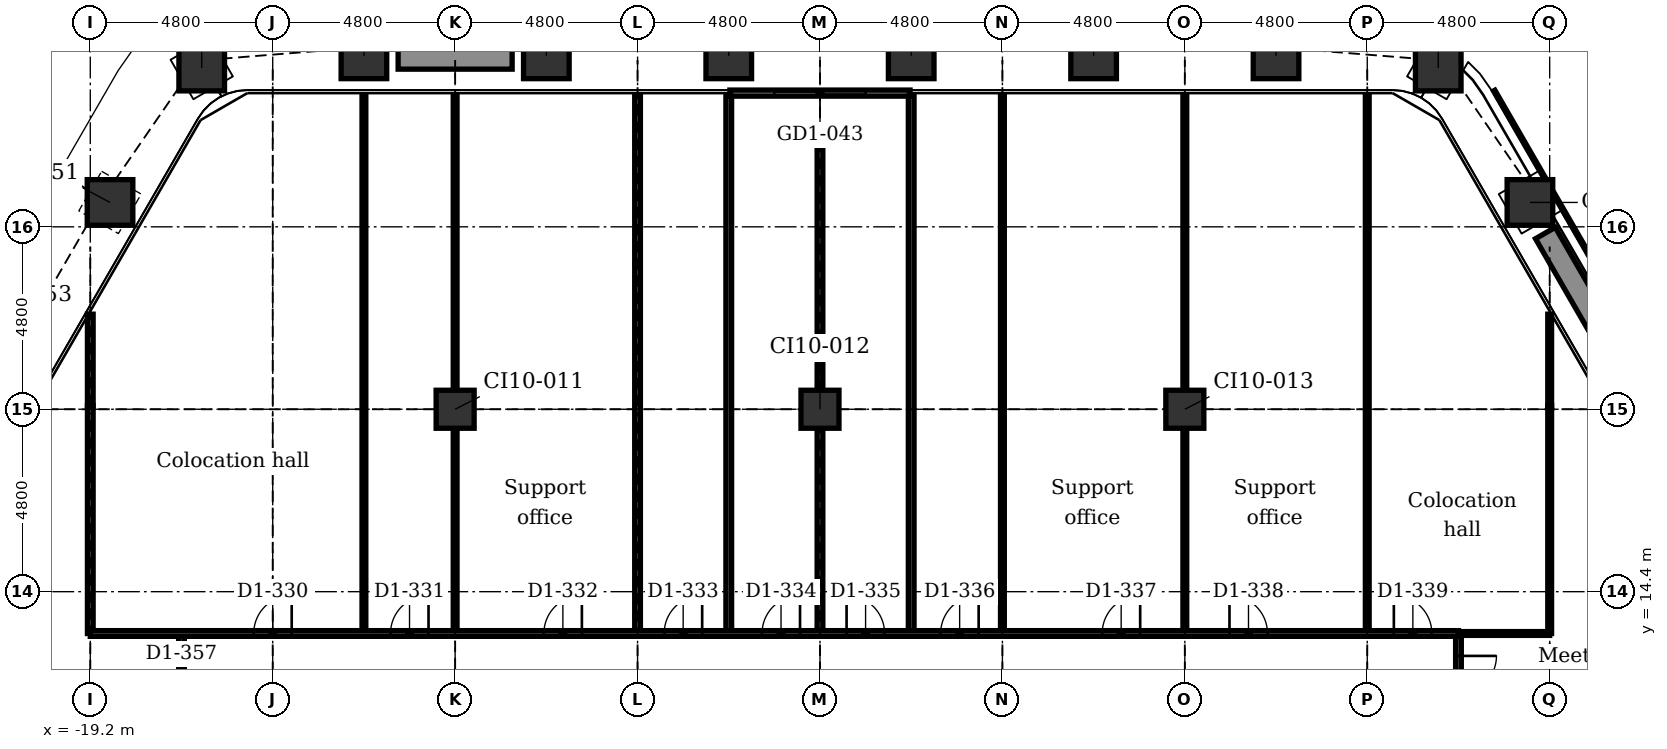
"""IFC4 building model, lengths in metres.
Left out: names, types, materials, properties, quantities, classifications, styles, units other than length and angle.
Written with IfcOpenShell. Run it as: python <this file> out.ifc"""

import sys

from ifc_helpers import new_model, si_unit, direction, frame, frame_2d, origin, origin_2d, place, context, subcontext, project, spatial, rectangle, extrude, element, fill, save


model = new_model("IFC4")
c1 = context("Model", 3, precision=1e-05, world=origin(), true_north=direction((0.0, 1.0)))
c2 = subcontext(c1, "Body", "Model", "MODEL_VIEW")
j1 = project(units=[si_unit("LENGTHUNIT", "METRE"), si_unit("PLANEANGLEUNIT", "RADIAN")], contexts=[c1])
p1 = place(None, origin())
s1 = spatial("IfcSite", under=j1, at=p1, CompositionType="ELEMENT")
p2 = place(p1, origin())
s2 = spatial("IfcBuilding", under=s1, at=p2, CompositionType="ELEMENT")
p3 = place(p2, frame((0.0, 0.0, 122.9)))
s3 = spatial("IfcBuildingStorey", under=s2, at=p3, CompositionType="ELEMENT", Elevation=122.9)
for number, where, z_axis, x_axis in (
    (1, (-16.268, 28.177, -0.2), (0.0, 0.0, 1.0), (0.866, 0.5, 0.0)),
    (2, (-12.0, 28.499, -0.2), (0.0, 0.0, 1.0), (1.0, 0.0, 0.0)),
    (3, (-7.2, 28.499, -0.2), (0.0, 0.0, 1.0), (1.0, 0.0, 0.0)),
    (4, (-2.4, 28.499, -0.2), (0.0, 0.0, 1.0), (1.0, 0.0, 0.0)),
    (5, (2.4, 28.499, -0.2), (0.0, 0.0, 1.0), (1.0, 0.0, 0.0)),
    (6, (7.2, 28.499, -0.2), (0.0, 0.0, 1.0), (1.0, 0.0, 0.0)),
    (7, (12.0, 28.499, -0.2), (0.0, 0.0, 1.0), (1.0, 0.0, 0.0)),
    (8, (16.268, 28.177, -0.2), (0.0, 0.0, 1.0), (0.5, 0.866, 0.0)),
    (9, (18.68, 24.642, -0.2), (0.0, 0.0, 1.0), (0.866, 0.5, 0.0)),
    (10, (-18.68, 24.642, -0.2), (0.0, 0.0, 1.0), (0.5, 0.866, 0.0)),
):
    element("IfcColumn", number, at=place(p3, frame(where, z_axis=z_axis, x_axis=x_axis)), inside=s3, PredefinedType="COLUMN", context=c2, shape_type="SweptSolid", body=[
        extrude(rectangle(XDim=1.2, YDim=1.2, at=origin_2d()), origin(), (0.0, 0.0, 1.0), 4.4),
    ])
for number, where, z_axis, x_axis in (
    (11, (-9.6, 19.2, -0.2), (0.0, 0.0, 1.0), (1.0, 0.0, 0.0)),
    (12, (0.0, 19.2, -0.2), (0.0, 0.0, 1.0), (1.0, 0.0, 0.0)),
    (13, (9.6, 19.2, -0.2), (0.0, 0.0, 1.0), (1.0, 0.0, 0.0)),
):
    element("IfcColumn", number, at=place(p3, frame(where, z_axis=z_axis, x_axis=x_axis)), inside=s3, PredefinedType="COLUMN", context=c2, shape_type="SweptSolid", body=[
        extrude(rectangle(XDim=1.0, YDim=1.0, at=origin_2d()), origin(), (0.0, 0.0, 1.0), 4.4),
    ])
p4 = place(p3, frame((-2.37, 27.519, 0.0), z_axis=(0.0, 0.0, 1.0), x_axis=(1.0, 0.0, 0.0)))
e14 = element("IfcWall", 14, at=p4, inside=s3, PredefinedType="PARTITIONING", context=c2, shape_type="SweptSolid", body=[
    extrude(rectangle(XDim=4.74, YDim=0.16, at=frame_2d((2.37, 0.0))), origin(), (0.0, 0.0, 1.0), 4.2),
])
p5 = place(p4, frame((1.17, 0.0, 0.0)))
e15 = element("IfcOpeningElement", 15, at=p5, cuts=e14, PredefinedType="OPENING", context=c2, shape_type="SweptSolid", body=[
    extrude(rectangle(XDim=2.4, YDim=2.4, at=frame_2d((1.2, 1.2))), frame((0.0, 0.09, 0.0), z_axis=(0.0, -1.0, 0.0), x_axis=(1.0, 0.0, 0.0)), (0.0, 0.0, 1.0), 0.18),
])
for number, where, z_axis, x_axis in (
    (16, (-11.1, 28.448, 0.0), (0.0, 0.0, 1.0), (1.0, 0.0, 0.0)),
    (17, (19.087, 23.837, 0.0), (0.0, 0.0, 1.0), (0.5, -0.866, 0.0)),
):
    element("IfcWall", number, at=place(p3, frame(where, z_axis=z_axis, x_axis=x_axis)), inside=s3, PredefinedType="USERDEFINED", context=c2, shape_type="SweptSolid", body=[
        extrude(rectangle(XDim=3.0, YDim=0.6, at=frame_2d((1.5, 0.0))), origin(), (0.0, 0.0, 1.0), 0.7),
    ])
p6 = place(p3, frame((19.2, 13.3, 0.0), z_axis=(0.0, 0.0, 1.0), x_axis=(0.0, 1.0, 0.0)))
e18 = element("IfcWall", 18, at=p6, inside=s3, PredefinedType="PARTITIONING", context=c2, shape_type="SweptSolid", body=[
    extrude(rectangle(XDim=5.993, YDim=0.1, at=frame_2d((2.997, 0.0))), origin(), (0.0, 0.0, 1.0), 3.743),
])
p7 = place(p3, frame((19.2, 19.293, 0.0), z_axis=(0.0, 0.0, 1.0), x_axis=(0.0, 1.0, 0.0)))
e19 = element("IfcWall", 19, at=p7, inside=s3, PredefinedType="PARTITIONING", context=c2, shape_type="SweptSolid", body=[
    extrude(rectangle(XDim=2.408, YDim=0.1, at=frame_2d((1.204, 0.0))), origin(), (0.0, 0.0, 1.0), 3.89),
])
p8 = place(p3, frame((16.8, 3.95, 0.0), z_axis=(0.0, 0.0, 1.0), x_axis=(0.0, 1.0, 0.0)))
e20 = element("IfcWall", 20, at=p8, inside=s3, PredefinedType="PARTITIONING", context=c2, shape_type="SweptSolid", body=[
    extrude(rectangle(XDim=9.35, YDim=0.15, at=frame_2d((4.675, 0.0))), origin(), (0.0, 0.0, 1.0), 4.2),
])
p9 = place(p8, frame((1.275, 0.0, 0.0)))
e21 = element("IfcOpeningElement", 21, at=p9, cuts=e20, PredefinedType="OPENING", context=c2, shape_type="SweptSolid", body=[
    extrude(rectangle(XDim=1.0, YDim=2.1, at=frame_2d((0.5, 1.05))), frame((0.0, 0.085, 0.0), z_axis=(0.0, -1.0, 0.0), x_axis=(1.0, 0.0, 0.0)), (0.0, 0.0, 1.0), 0.17),
])
p10 = place(p8, frame((7.76, 0.0, 0.0)))
e22 = element("IfcOpeningElement", 22, at=p10, cuts=e20, PredefinedType="OPENING", context=c2, shape_type="SweptSolid", body=[
    extrude(rectangle(XDim=1.0, YDim=2.1, at=frame_2d((0.5, 1.05))), frame((0.0, 0.085, 0.0), z_axis=(0.0, -1.0, 0.0), x_axis=(1.0, 0.0, 0.0)), (0.0, 0.0, 1.0), 0.17),
])
p11 = place(p8, frame((3.4, 0.0, 0.9)))
e23 = element("IfcOpeningElement", 23, at=p11, cuts=e20, PredefinedType="OPENING", context=c2, shape_type="SweptSolid", body=[
    extrude(rectangle(XDim=2.4, YDim=1.5, at=frame_2d((1.2, 0.75))), frame((0.0, 0.085, 0.0), z_axis=(0.0, -1.0, 0.0), x_axis=(1.0, 0.0, 0.0)), (0.0, 0.0, 1.0), 0.17),
])
p12 = place(p3, frame((14.4, 13.3, 0.0), z_axis=(0.0, 0.0, 1.0), x_axis=(0.0, 1.0, 0.0)))
e24 = element("IfcWall", 24, at=p12, inside=s3, PredefinedType="PARTITIONING", context=c2, shape_type="SweptSolid", body=[
    extrude(rectangle(XDim=14.128, YDim=0.1, at=frame_2d((7.064, 0.0))), origin(), (0.0, 0.0, 1.0), 3.743),
])
p13 = place(p3, frame((9.6, 13.3, 0.0), z_axis=(0.0, 0.0, 1.0), x_axis=(0.0, 1.0, 0.0)))
e25 = element("IfcWall", 25, at=p13, inside=s3, PredefinedType="PARTITIONING", context=c2, shape_type="SweptSolid", body=[
    extrude(rectangle(XDim=5.4, YDim=0.1, at=frame_2d((2.7, 0.0))), origin(), (0.0, 0.0, 1.0), 3.743),
])
p14 = place(p3, frame((9.6, 19.7, 0.0), z_axis=(0.0, 0.0, 1.0), x_axis=(0.0, 1.0, 0.0)))
e26 = element("IfcWall", 26, at=p14, inside=s3, PredefinedType="PARTITIONING", context=c2, shape_type="SweptSolid", body=[
    extrude(rectangle(XDim=7.729, YDim=0.1, at=frame_2d((3.864, 0.0))), origin(), (0.0, 0.0, 1.0), 3.743),
])
p15 = place(p3, frame((4.8, 13.3, 0.0), z_axis=(0.0, 0.0, 1.0), x_axis=(0.0, 1.0, 0.0)))
e27 = element("IfcWall", 27, at=p15, inside=s3, PredefinedType="PARTITIONING", context=c2, shape_type="SweptSolid", body=[
    extrude(rectangle(XDim=14.128, YDim=0.1, at=frame_2d((7.064, 0.0))), origin(), (0.0, 0.0, 1.0), 3.743),
])
p16 = place(p3, frame((2.4, 13.3, 0.0), z_axis=(0.0, 0.0, 1.0), x_axis=(0.0, 1.0, 0.0)))
e28 = element("IfcWall", 28, at=p16, inside=s3, PredefinedType="PARTITIONING", context=c2, shape_type="SweptSolid", body=[
    extrude(rectangle(XDim=14.138, YDim=0.15, at=frame_2d((7.069, 0.0))), origin(), (0.0, 0.0, 1.0), 4.2),
])
p17 = place(p3, frame((0.0, 13.3, 0.0), z_axis=(0.0, 0.0, 1.0), x_axis=(0.0, 1.0, 0.0)))
e29 = element("IfcWall", 29, at=p17, inside=s3, PredefinedType="PARTITIONING", context=c2, shape_type="SweptSolid", body=[
    extrude(rectangle(XDim=5.4, YDim=0.15, at=frame_2d((2.7, 0.0))), origin(), (0.0, 0.0, 1.0), 3.743),
])
p18 = place(p3, frame((0.0, 19.7, 0.0), z_axis=(0.0, 0.0, 1.0), x_axis=(0.0, 1.0, 0.0)))
e30 = element("IfcWall", 30, at=p18, inside=s3, PredefinedType="PARTITIONING", context=c2, shape_type="SweptSolid", body=[
    extrude(rectangle(XDim=6.619, YDim=0.15, at=frame_2d((3.309, 0.0))), origin(), (0.0, 0.0, 1.0), 3.743),
])
p19 = place(p3, frame((-2.4, 13.3, 0.0), z_axis=(0.0, 0.0, 1.0), x_axis=(0.0, 1.0, 0.0)))
e31 = element("IfcWall", 31, at=p19, inside=s3, PredefinedType="PARTITIONING", context=c2, shape_type="SweptSolid", body=[
    extrude(rectangle(XDim=14.138, YDim=0.15, at=frame_2d((7.069, 0.0))), origin(), (0.0, 0.0, 1.0), 4.2),
])
p20 = place(p3, frame((-4.8, 13.3, 0.0), z_axis=(0.0, 0.0, 1.0), x_axis=(0.0, 1.0, 0.0)))
e32 = element("IfcWall", 32, at=p20, inside=s3, PredefinedType="PARTITIONING", context=c2, shape_type="SweptSolid", body=[
    extrude(rectangle(XDim=14.128, YDim=0.15, at=frame_2d((7.064, 0.0))), origin(), (0.0, 0.0, 1.0), 3.743),
])
p21 = place(p3, frame((-9.6, 13.3, 0.0), z_axis=(0.0, 0.0, 1.0), x_axis=(0.0, 1.0, 0.0)))
e33 = element("IfcWall", 33, at=p21, inside=s3, PredefinedType="PARTITIONING", context=c2, shape_type="SweptSolid", body=[
    extrude(rectangle(XDim=5.4, YDim=0.1, at=frame_2d((2.7, 0.0))), origin(), (0.0, 0.0, 1.0), 3.743),
])
p22 = place(p3, frame((-9.6, 19.7, 0.0), z_axis=(0.0, 0.0, 1.0), x_axis=(0.0, 1.0, 0.0)))
e34 = element("IfcWall", 34, at=p22, inside=s3, PredefinedType="PARTITIONING", context=c2, shape_type="SweptSolid", body=[
    extrude(rectangle(XDim=7.729, YDim=0.1, at=frame_2d((3.864, 0.0))), origin(), (0.0, 0.0, 1.0), 3.743),
])
p23 = place(p3, frame((-12.0, 13.3, 0.0), z_axis=(0.0, 0.0, 1.0), x_axis=(0.0, 1.0, 0.0)))
e35 = element("IfcWall", 35, at=p23, inside=s3, PredefinedType="PARTITIONING", context=c2, shape_type="SweptSolid", body=[
    extrude(rectangle(XDim=14.128, YDim=0.1, at=frame_2d((7.064, 0.0))), origin(), (0.0, 0.0, 1.0), 4.2),
])
p24 = place(p3, frame((-16.8, 3.95, 0.0), z_axis=(0.0, 0.0, 1.0), x_axis=(0.0, 1.0, 0.0)))
e36 = element("IfcWall", 36, at=p24, inside=s3, PredefinedType="PARTITIONING", context=c2, shape_type="SweptSolid", body=[
    extrude(rectangle(XDim=9.35, YDim=0.15, at=frame_2d((4.675, 0.0))), origin(), (0.0, 0.0, 1.0), 4.2),
])
p25 = place(p24, frame((0.625, 0.0, 0.0)))
e37 = element("IfcOpeningElement", 37, at=p25, cuts=e36, PredefinedType="OPENING", context=c2, shape_type="SweptSolid", body=[
    extrude(rectangle(XDim=1.0, YDim=2.1, at=frame_2d((0.5, 1.05))), frame((0.0, 0.085, 0.0), z_axis=(0.0, -1.0, 0.0), x_axis=(1.0, 0.0, 0.0)), (0.0, 0.0, 1.0), 0.17),
])
p26 = place(p24, frame((3.85, 0.0, 0.0)))
e38 = element("IfcOpeningElement", 38, at=p26, cuts=e36, PredefinedType="OPENING", context=c2, shape_type="SweptSolid", body=[
    extrude(rectangle(XDim=1.0, YDim=2.1, at=frame_2d((0.5, 1.05))), frame((0.0, 0.085, 0.0), z_axis=(0.0, -1.0, 0.0), x_axis=(1.0, 0.0, 0.0)), (0.0, 0.0, 1.0), 0.17),
])
p27 = place(p24, frame((7.2, 0.0, 0.0)))
e39 = element("IfcOpeningElement", 39, at=p27, cuts=e36, PredefinedType="OPENING", context=c2, shape_type="SweptSolid", body=[
    extrude(rectangle(XDim=1.0, YDim=2.1, at=frame_2d((0.5, 1.05))), frame((0.0, 0.085, 0.0), z_axis=(0.0, -1.0, 0.0), x_axis=(1.0, 0.0, 0.0)), (0.0, 0.0, 1.0), 0.17),
])
p28 = place(p3, frame((-19.2, 13.3, 0.0), z_axis=(0.0, 0.0, 1.0), x_axis=(0.0, 1.0, 0.0)))
e40 = element("IfcWall", 40, at=p28, inside=s3, PredefinedType="PARTITIONING", context=c2, shape_type="SweptSolid", body=[
    extrude(rectangle(XDim=5.993, YDim=0.15, at=frame_2d((2.997, 0.0))), origin(), (0.0, 0.0, 1.0), 3.743),
])
p29 = place(p3, frame((-19.2, 19.293, 0.0), z_axis=(0.0, 0.0, 1.0), x_axis=(0.0, 1.0, 0.0)))
e41 = element("IfcWall", 41, at=p29, inside=s3, PredefinedType="PARTITIONING", context=c2, shape_type="SweptSolid", body=[
    extrude(rectangle(XDim=2.408, YDim=0.15, at=frame_2d((1.204, 0.0))), origin(), (0.0, 0.0, 1.0), 3.89),
])
p30 = place(p3, frame((16.8, 13.3, 0.0), z_axis=(0.0, 0.0, 1.0), x_axis=(1.0, 0.0, 0.0)))
e42 = element("IfcWall", 42, at=p30, inside=s3, PredefinedType="PARTITIONING", context=c2, shape_type="SweptSolid", body=[
    extrude(rectangle(XDim=2.4, YDim=0.1, at=frame_2d((1.2, 0.0))), origin(), (0.0, 0.0, 1.0), 4.2),
])
p31 = place(p3, frame((-19.2, 13.3, 0.0), z_axis=(0.0, 0.0, 1.0), x_axis=(1.0, 0.0, 0.0)))
e43 = element("IfcWall", 43, at=p31, inside=s3, PredefinedType="PARTITIONING", context=c2, shape_type="SweptSolid", body=[
    extrude(rectangle(XDim=36.0, YDim=0.15, at=frame_2d((18.0, 0.0))), origin(), (0.0, 0.0, 1.0), 4.2),
])
p32 = place(p31, frame((4.3, 0.0, 0.0)))
e44 = element("IfcOpeningElement", 44, at=p32, cuts=e43, PredefinedType="OPENING", context=c2, shape_type="SweptSolid", body=[
    extrude(rectangle(XDim=1.0, YDim=2.1, at=frame_2d((0.5, 1.05))), frame((0.0, 0.085, 0.0), z_axis=(0.0, -1.0, 0.0), x_axis=(1.0, 0.0, 0.0)), (0.0, 0.0, 1.0), 0.17),
])
p33 = place(p31, frame((7.9, 0.0, 0.0)))
e45 = element("IfcOpeningElement", 45, at=p33, cuts=e43, PredefinedType="OPENING", context=c2, shape_type="SweptSolid", body=[
    extrude(rectangle(XDim=1.0, YDim=2.1, at=frame_2d((0.5, 1.05))), frame((0.0, 0.085, 0.0), z_axis=(0.0, -1.0, 0.0), x_axis=(1.0, 0.0, 0.0)), (0.0, 0.0, 1.0), 0.17),
])
p34 = place(p31, frame((11.935, 0.0, 0.0)))
e46 = element("IfcOpeningElement", 46, at=p34, cuts=e43, PredefinedType="OPENING", context=c2, shape_type="SweptSolid", body=[
    extrude(rectangle(XDim=1.0, YDim=2.1, at=frame_2d((0.5, 1.05))), frame((0.0, 0.085, 0.0), z_axis=(0.0, -1.0, 0.0), x_axis=(1.0, 0.0, 0.0)), (0.0, 0.0, 1.0), 0.17),
])
p35 = place(p31, frame((15.1, 0.0, 0.0)))
e47 = element("IfcOpeningElement", 47, at=p35, cuts=e43, PredefinedType="OPENING", context=c2, shape_type="SweptSolid", body=[
    extrude(rectangle(XDim=1.0, YDim=2.1, at=frame_2d((0.5, 1.05))), frame((0.0, 0.085, 0.0), z_axis=(0.0, -1.0, 0.0), x_axis=(1.0, 0.0, 0.0)), (0.0, 0.0, 1.0), 0.17),
])
p36 = place(p31, frame((17.675, 0.0, 0.0)))
e48 = element("IfcOpeningElement", 48, at=p36, cuts=e43, PredefinedType="OPENING", context=c2, shape_type="SweptSolid", body=[
    extrude(rectangle(XDim=1.0, YDim=2.1, at=frame_2d((0.5, 1.05))), frame((0.0, 0.085, 0.0), z_axis=(0.0, -1.0, 0.0), x_axis=(1.0, 0.0, 0.0)), (0.0, 0.0, 1.0), 0.17),
])
p37 = place(p31, frame((19.9, 0.0, 0.0)))
e49 = element("IfcOpeningElement", 49, at=p37, cuts=e43, PredefinedType="OPENING", context=c2, shape_type="SweptSolid", body=[
    extrude(rectangle(XDim=1.0, YDim=2.1, at=frame_2d((0.5, 1.05))), frame((0.0, 0.085, 0.0), z_axis=(0.0, -1.0, 0.0), x_axis=(1.0, 0.0, 0.0)), (0.0, 0.0, 1.0), 0.17),
])
p38 = place(p31, frame((22.375, 0.0, 0.0)))
e50 = element("IfcOpeningElement", 50, at=p38, cuts=e43, PredefinedType="OPENING", context=c2, shape_type="SweptSolid", body=[
    extrude(rectangle(XDim=1.0, YDim=2.1, at=frame_2d((0.5, 1.05))), frame((0.0, 0.085, 0.0), z_axis=(0.0, -1.0, 0.0), x_axis=(1.0, 0.0, 0.0)), (0.0, 0.0, 1.0), 0.17),
])
p39 = place(p31, frame((26.625, 0.0, 0.0)))
e51 = element("IfcOpeningElement", 51, at=p39, cuts=e43, PredefinedType="OPENING", context=c2, shape_type="SweptSolid", body=[
    extrude(rectangle(XDim=1.0, YDim=2.1, at=frame_2d((0.5, 1.05))), frame((0.0, 0.085, 0.0), z_axis=(0.0, -1.0, 0.0), x_axis=(1.0, 0.0, 0.0)), (0.0, 0.0, 1.0), 0.17),
])
p40 = place(p31, frame((29.975, 0.0, 0.0)))
e52 = element("IfcOpeningElement", 52, at=p40, cuts=e43, PredefinedType="OPENING", context=c2, shape_type="SweptSolid", body=[
    extrude(rectangle(XDim=1.0, YDim=2.1, at=frame_2d((0.5, 1.05))), frame((0.0, 0.085, 0.0), z_axis=(0.0, -1.0, 0.0), x_axis=(1.0, 0.0, 0.0)), (0.0, 0.0, 1.0), 0.17),
])
p41 = place(p31, frame((34.3, 0.0, 0.0)))
e53 = element("IfcOpeningElement", 53, at=p41, cuts=e43, PredefinedType="OPENING", context=c2, shape_type="SweptSolid", body=[
    extrude(rectangle(XDim=1.0, YDim=2.1, at=frame_2d((0.5, 1.05))), frame((0.0, 0.085, 0.0), z_axis=(0.0, -1.0, 0.0), x_axis=(1.0, 0.0, 0.0)), (0.0, 0.0, 1.0), 0.17),
])
p42 = place(p5, origin())
e54 = element("IfcDoor", 54, at=p42, inside=s3, OperationType="DOUBLE_DOOR_SLIDING", PredefinedType="DOOR", context=c2, shape_type="SweptSolid", body=[
    extrude(rectangle(XDim=2.4, YDim=2.4, at=frame_2d((1.2, 1.2))), frame((0.0, 0.025, 0.0), z_axis=(0.0, -1.0, 0.0), x_axis=(1.0, 0.0, 0.0)), (0.0, 0.0, 1.0), 0.05),
])
fill(e15, e54)
p43 = place(p32, origin())
e55 = element("IfcDoor", 55, at=p43, inside=s3, OperationType="SINGLE_SWING_RIGHT", PredefinedType="DOOR", context=c2, shape_type="SweptSolid", body=[
    extrude(rectangle(XDim=1.0, YDim=2.1, at=frame_2d((0.5, 1.05))), frame((0.0, 0.025, 0.0), z_axis=(0.0, -1.0, 0.0), x_axis=(1.0, 0.0, 0.0)), (0.0, 0.0, 1.0), 0.05),
])
fill(e44, e55)
p44 = place(p33, origin())
e56 = element("IfcDoor", 56, at=p44, inside=s3, OperationType="SINGLE_SWING_RIGHT", PredefinedType="DOOR", context=c2, shape_type="SweptSolid", body=[
    extrude(rectangle(XDim=1.0, YDim=2.1, at=frame_2d((0.5, 1.05))), frame((0.0, 0.025, 0.0), z_axis=(0.0, -1.0, 0.0), x_axis=(1.0, 0.0, 0.0)), (0.0, 0.0, 1.0), 0.05),
])
fill(e45, e56)
p45 = place(p34, origin())
e57 = element("IfcDoor", 57, at=p45, inside=s3, OperationType="SINGLE_SWING_RIGHT", PredefinedType="DOOR", context=c2, shape_type="SweptSolid", body=[
    extrude(rectangle(XDim=1.0, YDim=2.1, at=frame_2d((0.5, 1.05))), frame((0.0, 0.025, 0.0), z_axis=(0.0, -1.0, 0.0), x_axis=(1.0, 0.0, 0.0)), (0.0, 0.0, 1.0), 0.05),
])
fill(e46, e57)
p46 = place(p35, origin())
e58 = element("IfcDoor", 58, at=p46, inside=s3, OperationType="SINGLE_SWING_RIGHT", PredefinedType="DOOR", context=c2, shape_type="SweptSolid", body=[
    extrude(rectangle(XDim=1.0, YDim=2.1, at=frame_2d((0.5, 1.05))), frame((0.0, 0.025, 0.0), z_axis=(0.0, -1.0, 0.0), x_axis=(1.0, 0.0, 0.0)), (0.0, 0.0, 1.0), 0.05),
])
fill(e47, e58)
p47 = place(p36, origin())
e59 = element("IfcDoor", 59, at=p47, inside=s3, OperationType="SINGLE_SWING_RIGHT", PredefinedType="DOOR", context=c2, shape_type="SweptSolid", body=[
    extrude(rectangle(XDim=1.0, YDim=2.1, at=frame_2d((0.5, 1.05))), frame((0.0, 0.025, 0.0), z_axis=(0.0, -1.0, 0.0), x_axis=(1.0, 0.0, 0.0)), (0.0, 0.0, 1.0), 0.05),
])
fill(e48, e59)
p48 = place(p37, origin())
e60 = element("IfcDoor", 60, at=p48, inside=s3, OperationType="SINGLE_SWING_LEFT", PredefinedType="DOOR", context=c2, shape_type="SweptSolid", body=[
    extrude(rectangle(XDim=1.0, YDim=2.1, at=frame_2d((0.5, 1.05))), frame((0.0, 0.025, 0.0), z_axis=(0.0, -1.0, 0.0), x_axis=(1.0, 0.0, 0.0)), (0.0, 0.0, 1.0), 0.05),
])
fill(e49, e60)
p49 = place(p38, origin())
e61 = element("IfcDoor", 61, at=p49, inside=s3, OperationType="SINGLE_SWING_RIGHT", PredefinedType="DOOR", context=c2, shape_type="SweptSolid", body=[
    extrude(rectangle(XDim=1.0, YDim=2.1, at=frame_2d((0.5, 1.05))), frame((0.0, 0.025, 0.0), z_axis=(0.0, -1.0, 0.0), x_axis=(1.0, 0.0, 0.0)), (0.0, 0.0, 1.0), 0.05),
])
fill(e50, e61)
p50 = place(p39, origin())
e62 = element("IfcDoor", 62, at=p50, inside=s3, OperationType="SINGLE_SWING_RIGHT", PredefinedType="DOOR", context=c2, shape_type="SweptSolid", body=[
    extrude(rectangle(XDim=1.0, YDim=2.1, at=frame_2d((0.5, 1.05))), frame((0.0, 0.025, 0.0), z_axis=(0.0, -1.0, 0.0), x_axis=(1.0, 0.0, 0.0)), (0.0, 0.0, 1.0), 0.05),
])
fill(e51, e62)
p51 = place(p40, origin())
e63 = element("IfcDoor", 63, at=p51, inside=s3, OperationType="SINGLE_SWING_LEFT", PredefinedType="DOOR", context=c2, shape_type="SweptSolid", body=[
    extrude(rectangle(XDim=1.0, YDim=2.1, at=frame_2d((0.5, 1.05))), frame((0.0, 0.025, 0.0), z_axis=(0.0, -1.0, 0.0), x_axis=(1.0, 0.0, 0.0)), (0.0, 0.0, 1.0), 0.05),
])
fill(e52, e63)
p52 = place(p41, origin())
e64 = element("IfcDoor", 64, at=p52, inside=s3, OperationType="SINGLE_SWING_LEFT", PredefinedType="DOOR", context=c2, shape_type="SweptSolid", body=[
    extrude(rectangle(XDim=1.0, YDim=2.1, at=frame_2d((0.5, 1.05))), frame((0.0, 0.025, 0.0), z_axis=(0.0, -1.0, 0.0), x_axis=(1.0, 0.0, 0.0)), (0.0, 0.0, 1.0), 0.05),
])
fill(e53, e64)
p53 = place(p10, frame((1.0, 0.0, 0.0), z_axis=(0.0, 0.0, 1.0), x_axis=(-1.0, 0.0, 0.0)))
e65 = element("IfcDoor", 65, at=p53, inside=s3, OperationType="SINGLE_SWING_RIGHT", PredefinedType="DOOR", context=c2, shape_type="SweptSolid", body=[
    extrude(rectangle(XDim=1.0, YDim=2.1, at=frame_2d((0.5, 1.05))), frame((0.0, 0.025, 0.0), z_axis=(0.0, -1.0, 0.0), x_axis=(1.0, 0.0, 0.0)), (0.0, 0.0, 1.0), 0.05),
])
fill(e22, e65)
save(model, sys.argv[1])
